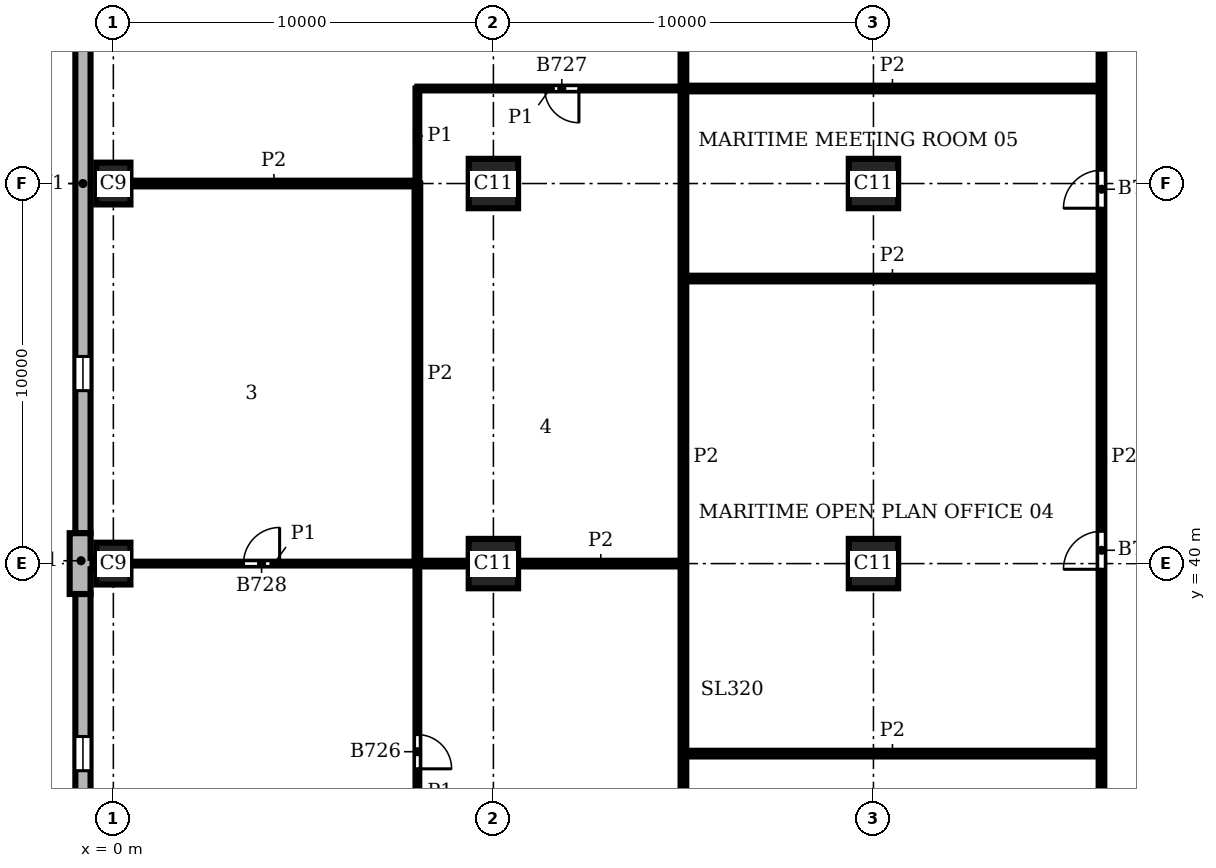
"""IFC4 building model, lengths in metres.
Left out: names, types, materials, properties, quantities, classifications, styles, units other than length and angle.
Written with IfcOpenShell. Run it as: python <this file> out.ifc"""

import sys

from ifc_helpers import new_model, si_unit, direction, frame, frame_2d, origin, origin_2d, place, context, subcontext, project, spatial, polyline, rectangle, outline, extrude, element, fill, save


model = new_model("IFC4")
c1 = context("Model", 3, precision=1e-05, world=origin(), true_north=direction((0.0, 1.0)))
c2 = subcontext(c1, "Body", "Model", "MODEL_VIEW")
j1 = project(units=[si_unit("LENGTHUNIT", "METRE"), si_unit("PLANEANGLEUNIT", "RADIAN")], contexts=[c1])
p1 = place(None, origin())
s1 = spatial("IfcSite", under=j1, at=p1, CompositionType="ELEMENT")
p2 = place(p1, origin())
s2 = spatial("IfcBuilding", under=s1, at=p2, CompositionType="ELEMENT")
p3 = place(p2, frame((0.0, 0.0, 209.7)))
s3 = spatial("IfcBuildingStorey", under=s2, at=p3, CompositionType="ELEMENT", Elevation=209.7)
for number, where, z_axis, x_axis in (
    (1, (0.0, 50.0, 0.0), (0.0, 0.0, 1.0), (0.0, 1.0, 0.0)),
    (2, (0.0, 40.0, 0.0), (0.0, 0.0, 1.0), (0.0, 1.0, 0.0)),
):
    element("IfcColumn", number, at=place(p3, frame(where, z_axis=z_axis, x_axis=x_axis)), inside=s3, PredefinedType="COLUMN", context=c2, shape_type="SweptSolid", body=[
        extrude(rectangle(XDim=1.1, YDim=0.9, at=origin_2d()), origin(), (0.0, 0.0, 1.0), 3.9),
    ])
for number, where, z_axis, x_axis in (
    (3, (10.0, 40.0, 0.0), (0.0, 0.0, 1.0), (1.0, 0.0, 0.0)),
    (4, (10.0, 50.0, 0.0), (0.0, 0.0, 1.0), (1.0, 0.0, 0.0)),
    (5, (20.0, 40.0, 0.0), (0.0, 0.0, 1.0), (1.0, 0.0, 0.0)),
    (6, (20.0, 50.0, 0.0), (0.0, 0.0, 1.0), (1.0, 0.0, 0.0)),
):
    element("IfcColumn", number, at=place(p3, frame(where, z_axis=z_axis, x_axis=x_axis)), inside=s3, PredefinedType="COLUMN", context=c2, shape_type="SweptSolid", body=[
        extrude(rectangle(XDim=1.3, YDim=1.3, at=origin_2d()), origin(), (0.0, 0.0, 1.0), 3.9),
    ])
p4 = place(p3, origin())
e7 = element("IfcWall", 7, at=p4, inside=s3, PredefinedType="SOLIDWALL", context=c2, shape_type="SweptSolid", body=[
    extrude(outline(polyline([(-0.6, 39.2), (-0.6, 39.85), (-0.55, 39.85), (-0.55, 40.15), (-0.6, 40.15), (-0.6, 40.8), (-1.0, 40.8), (-1.15, 40.8), (-1.15, 40.0), (-1.15, 39.2), (-1.0, 39.2), (-0.6, 39.2)])), origin(), (0.0, 0.0, 1.0), 3.9),
])
p5 = place(p3, frame((-0.8, 59.2, 0.0), z_axis=(0.0, 0.0, 1.0), x_axis=(0.0, -1.0, 0.0)))
e8 = element("IfcWall", 8, at=p5, inside=s3, PredefinedType="SOLIDWALL", context=c2, shape_type="SweptSolid", body=[
    extrude(rectangle(XDim=18.4, YDim=0.4, at=frame_2d((9.2, 0.0))), origin(), (0.0, 0.0, 1.0), 3.9),
])
p6 = place(p5, frame((3.75, 0.0, 0.9)))
e9 = element("IfcOpeningElement", 9, at=p6, cuts=e8, PredefinedType="OPENING", context=c2, shape_type="SweptSolid", body=[
    extrude(rectangle(XDim=0.9, YDim=2.35, at=frame_2d((0.45, 1.175))), frame((0.0, 0.21, 0.0), z_axis=(0.0, -1.0, 0.0), x_axis=(1.0, 0.0, 0.0)), (0.0, 0.0, 1.0), 0.42),
])
p7 = place(p5, frame((13.75, 0.0, 0.9)))
e10 = element("IfcOpeningElement", 10, at=p7, cuts=e8, PredefinedType="OPENING", context=c2, shape_type="SweptSolid", body=[
    extrude(rectangle(XDim=0.9, YDim=2.35, at=frame_2d((0.45, 1.175))), frame((0.0, 0.21, 0.0), z_axis=(0.0, -1.0, 0.0), x_axis=(1.0, 0.0, 0.0)), (0.0, 0.0, 1.0), 0.42),
])
p8 = place(p3, frame((-0.8, 39.2, 0.0), z_axis=(0.0, 0.0, 1.0), x_axis=(0.0, -1.0, 0.0)))
e11 = element("IfcWall", 11, at=p8, inside=s3, PredefinedType="SOLIDWALL", context=c2, shape_type="SweptSolid", body=[
    extrude(rectangle(XDim=18.4, YDim=0.4, at=frame_2d((9.2, 0.0))), origin(), (0.0, 0.0, 1.0), 3.9),
])
p9 = place(p8, frame((3.75, 0.0, 0.9)))
e12 = element("IfcOpeningElement", 12, at=p9, cuts=e11, PredefinedType="OPENING", context=c2, shape_type="SweptSolid", body=[
    extrude(rectangle(XDim=0.9, YDim=2.35, at=frame_2d((0.45, 1.175))), frame((0.0, 0.21, 0.0), z_axis=(0.0, -1.0, 0.0), x_axis=(1.0, 0.0, 0.0)), (0.0, 0.0, 1.0), 0.42),
])
p10 = place(p8, frame((13.75, 0.0, 0.9)))
e13 = element("IfcOpeningElement", 13, at=p10, cuts=e11, PredefinedType="OPENING", context=c2, shape_type="SweptSolid", body=[
    extrude(rectangle(XDim=0.9, YDim=2.35, at=frame_2d((0.45, 1.175))), frame((0.0, 0.21, 0.0), z_axis=(0.0, -1.0, 0.0), x_axis=(1.0, 0.0, 0.0)), (0.0, 0.0, 1.0), 0.42),
])
p11 = place(p3, frame((8.0, 28.0, 0.0), z_axis=(0.0, 0.0, 1.0), x_axis=(0.0, 1.0, 0.0)))
e14 = element("IfcWall", 14, at=p11, inside=s3, PredefinedType="PARTITIONING", context=c2, shape_type="SweptSolid", body=[
    extrude(rectangle(XDim=12.0, YDim=0.1, at=frame_2d((6.0, 0.0))), origin(), (0.0, 0.0, 1.0), 3.58),
])
p12 = place(p11, frame((6.6, 0.0, 0.0)))
e15 = element("IfcOpeningElement", 15, at=p12, cuts=e14, PredefinedType="OPENING", context=c2, shape_type="SweptSolid", body=[
    extrude(rectangle(XDim=0.9, YDim=2.1, at=frame_2d((0.45, 1.05))), frame((0.0, 0.06, 0.0), z_axis=(0.0, -1.0, 0.0), x_axis=(1.0, 0.0, 0.0)), (0.0, 0.0, 1.0), 0.12),
])
p13 = place(p3, frame((8.0, 50.0, 0.0), z_axis=(0.0, 0.0, 1.0), x_axis=(0.0, 1.0, 0.0)))
e16 = element("IfcWall", 16, at=p13, inside=s3, PredefinedType="PARTITIONING", context=c2, shape_type="SweptSolid", body=[
    extrude(rectangle(XDim=2.5, YDim=0.1, at=frame_2d((1.25, 0.0))), origin(), (0.0, 0.0, 1.0), 3.58),
])
p14 = place(p3, frame((0.45, 40.0, 0.0), z_axis=(0.0, 0.0, 1.0), x_axis=(1.0, 0.0, 0.0)))
e17 = element("IfcWall", 17, at=p14, inside=s3, PredefinedType="PARTITIONING", context=c2, shape_type="SweptSolid", body=[
    extrude(rectangle(XDim=7.55, YDim=0.1, at=frame_2d((3.775, 0.0))), origin(), (0.0, 0.0, 1.0), 3.58),
])
p15 = place(p14, frame((2.975, 0.0, 0.0)))
e18 = element("IfcOpeningElement", 18, at=p15, cuts=e17, PredefinedType="OPENING", context=c2, shape_type="SweptSolid", body=[
    extrude(rectangle(XDim=0.95, YDim=2.1, at=frame_2d((0.475, 1.05))), frame((0.0, 0.06, 0.0), z_axis=(0.0, -1.0, 0.0), x_axis=(1.0, 0.0, 0.0)), (0.0, 0.0, 1.0), 0.12),
])
p16 = place(p3, frame((8.0, 52.5, 0.0), z_axis=(0.0, 0.0, 1.0), x_axis=(1.0, 0.0, 0.0)))
e19 = element("IfcWall", 19, at=p16, inside=s3, PredefinedType="PARTITIONING", context=c2, shape_type="SweptSolid", body=[
    extrude(rectangle(XDim=7.0, YDim=0.1, at=frame_2d((3.5, 0.0))), origin(), (0.0, 0.0, 1.0), 3.58),
])
p17 = place(p16, frame((3.35, 0.0, 0.0)))
e20 = element("IfcOpeningElement", 20, at=p17, cuts=e19, PredefinedType="OPENING", context=c2, shape_type="SweptSolid", body=[
    extrude(rectangle(XDim=0.9, YDim=2.1, at=frame_2d((0.45, 1.05))), frame((0.0, 0.06, 0.0), z_axis=(0.0, -1.0, 0.0), x_axis=(1.0, 0.0, 0.0)), (0.0, 0.0, 1.0), 0.12),
])
p18 = place(p3, frame((8.0, 40.0, 0.0), z_axis=(0.0, 0.0, 1.0), x_axis=(0.0, 1.0, 0.0)))
e21 = element("IfcWall", 21, at=p18, inside=s3, PredefinedType="PARTITIONING", context=c2, shape_type="SweptSolid", body=[
    extrude(rectangle(XDim=10.0, YDim=0.15, at=frame_2d((5.0, 0.0))), origin(), (0.0, 0.0, 1.0), 3.58),
])
p19 = place(p3, frame((15.0, 28.0, 0.0), z_axis=(0.0, 0.0, 1.0), x_axis=(0.0, 1.0, 0.0)))
e22 = element("IfcWall", 22, at=p19, inside=s3, PredefinedType="PARTITIONING", context=c2, shape_type="SweptSolid", body=[
    extrude(rectangle(XDim=29.6, YDim=0.15, at=frame_2d((14.8, 0.0))), origin(), (0.0, 0.0, 1.0), 3.58),
])
p20 = place(p3, frame((26.0, 28.0, 0.0), z_axis=(0.0, 0.0, 1.0), x_axis=(0.0, 1.0, 0.0)))
e23 = element("IfcWall", 23, at=p20, inside=s3, PredefinedType="PARTITIONING", context=c2, shape_type="SweptSolid", body=[
    extrude(rectangle(XDim=29.6, YDim=0.15, at=frame_2d((14.8, 0.0))), origin(), (0.0, 0.0, 1.0), 3.58),
])
p21 = place(p20, frame((3.6, 0.0, 0.0)))
e24 = element("IfcOpeningElement", 24, at=p21, cuts=e23, PredefinedType="OPENING", context=c2, shape_type="SweptSolid", body=[
    extrude(rectangle(XDim=1.0, YDim=2.1, at=frame_2d((0.5, 1.05))), frame((0.0, 0.085, 0.0), z_axis=(0.0, -1.0, 0.0), x_axis=(1.0, 0.0, 0.0)), (0.0, 0.0, 1.0), 0.17),
])
p22 = place(p20, frame((11.85, 0.0, 0.0)))
e25 = element("IfcOpeningElement", 25, at=p22, cuts=e23, PredefinedType="OPENING", context=c2, shape_type="SweptSolid", body=[
    extrude(rectangle(XDim=1.0, YDim=2.1, at=frame_2d((0.5, 1.05))), frame((0.0, 0.085, 0.0), z_axis=(0.0, -1.0, 0.0), x_axis=(1.0, 0.0, 0.0)), (0.0, 0.0, 1.0), 0.17),
])
p23 = place(p20, frame((21.35, 0.0, 0.0)))
e26 = element("IfcOpeningElement", 26, at=p23, cuts=e23, PredefinedType="OPENING", context=c2, shape_type="SweptSolid", body=[
    extrude(rectangle(XDim=1.0, YDim=2.1, at=frame_2d((0.5, 1.05))), frame((0.0, 0.085, 0.0), z_axis=(0.0, -1.0, 0.0), x_axis=(1.0, 0.0, 0.0)), (0.0, 0.0, 1.0), 0.17),
])
p24 = place(p3, frame((15.0, 35.0, 0.0), z_axis=(0.0, 0.0, 1.0), x_axis=(1.0, 0.0, 0.0)))
e27 = element("IfcWall", 27, at=p24, inside=s3, PredefinedType="PARTITIONING", context=c2, shape_type="SweptSolid", body=[
    extrude(rectangle(XDim=11.0, YDim=0.15, at=frame_2d((5.5, 0.0))), origin(), (0.0, 0.0, 1.0), 3.58),
])
p25 = place(p3, frame((8.0, 40.0, 0.0), z_axis=(0.0, 0.0, 1.0), x_axis=(1.0, 0.0, 0.0)))
e28 = element("IfcWall", 28, at=p25, inside=s3, PredefinedType="PARTITIONING", context=c2, shape_type="SweptSolid", body=[
    extrude(rectangle(XDim=1.35, YDim=0.15, at=frame_2d((0.675, 0.0))), origin(), (0.0, 0.0, 1.0), 3.58),
])
p26 = place(p3, frame((10.65, 40.0, 0.0), z_axis=(0.0, 0.0, 1.0), x_axis=(1.0, 0.0, 0.0)))
e29 = element("IfcWall", 29, at=p26, inside=s3, PredefinedType="PARTITIONING", context=c2, shape_type="SweptSolid", body=[
    extrude(rectangle(XDim=4.35, YDim=0.15, at=frame_2d((2.175, 0.0))), origin(), (0.0, 0.0, 1.0), 3.58),
])
p27 = place(p3, frame((15.0, 47.5, 0.0), z_axis=(0.0, 0.0, 1.0), x_axis=(1.0, 0.0, 0.0)))
e30 = element("IfcWall", 30, at=p27, inside=s3, PredefinedType="PARTITIONING", context=c2, shape_type="SweptSolid", body=[
    extrude(rectangle(XDim=11.0, YDim=0.15, at=frame_2d((5.5, 0.0))), origin(), (0.0, 0.0, 1.0), 3.58),
])
p28 = place(p3, frame((0.45, 50.0, 0.0), z_axis=(0.0, 0.0, 1.0), x_axis=(1.0, 0.0, 0.0)))
e31 = element("IfcWall", 31, at=p28, inside=s3, PredefinedType="PARTITIONING", context=c2, shape_type="SweptSolid", body=[
    extrude(rectangle(XDim=7.55, YDim=0.15, at=frame_2d((3.775, 0.0))), origin(), (0.0, 0.0, 1.0), 3.58),
])
p29 = place(p3, frame((15.0, 52.5, 0.0), z_axis=(0.0, 0.0, 1.0), x_axis=(1.0, 0.0, 0.0)))
e32 = element("IfcWall", 32, at=p29, inside=s3, PredefinedType="PARTITIONING", context=c2, shape_type="SweptSolid", body=[
    extrude(rectangle(XDim=11.0, YDim=0.15, at=frame_2d((5.5, 0.0))), origin(), (0.0, 0.0, 1.0), 3.58),
])
p30 = place(p7, origin())
e33 = element("IfcWindow", 33, at=p30, inside=s3, PartitioningType="SINGLE_PANEL", PredefinedType="WINDOW", context=c2, shape_type="SweptSolid", body=[
    extrude(rectangle(XDim=0.9, YDim=2.35, at=frame_2d((0.45, 1.175))), frame((0.0, 0.16, 0.0), z_axis=(0.0, -1.0, 0.0), x_axis=(1.0, 0.0, 0.0)), (0.0, 0.0, 1.0), 0.06),
])
fill(e10, e33)
p31 = place(p9, origin())
e34 = element("IfcWindow", 34, at=p31, inside=s3, PartitioningType="SINGLE_PANEL", PredefinedType="WINDOW", context=c2, shape_type="SweptSolid", body=[
    extrude(rectangle(XDim=0.9, YDim=2.35, at=frame_2d((0.45, 1.175))), frame((0.0, 0.16, 0.0), z_axis=(0.0, -1.0, 0.0), x_axis=(1.0, 0.0, 0.0)), (0.0, 0.0, 1.0), 0.06),
])
fill(e12, e34)
p32 = place(p22, origin())
e35 = element("IfcDoor", 35, at=p32, inside=s3, OperationType="SINGLE_SWING_LEFT", PredefinedType="DOOR", context=c2, shape_type="SweptSolid", body=[
    extrude(rectangle(XDim=1.0, YDim=2.1, at=frame_2d((0.5, 1.05))), frame((0.0, 0.025, 0.0), z_axis=(0.0, -1.0, 0.0), x_axis=(1.0, 0.0, 0.0)), (0.0, 0.0, 1.0), 0.05),
])
fill(e25, e35)
p33 = place(p23, origin())
e36 = element("IfcDoor", 36, at=p33, inside=s3, OperationType="SINGLE_SWING_LEFT", PredefinedType="DOOR", context=c2, shape_type="SweptSolid", body=[
    extrude(rectangle(XDim=1.0, YDim=2.1, at=frame_2d((0.5, 1.05))), frame((0.0, 0.025, 0.0), z_axis=(0.0, -1.0, 0.0), x_axis=(1.0, 0.0, 0.0)), (0.0, 0.0, 1.0), 0.05),
])
fill(e26, e36)
p34 = place(p12, frame((0.9, 0.0, 0.0), z_axis=(0.0, 0.0, 1.0), x_axis=(-1.0, 0.0, 0.0)))
e37 = element("IfcDoor", 37, at=p34, inside=s3, OperationType="SINGLE_SWING_RIGHT", PredefinedType="DOOR", context=c2, shape_type="SweptSolid", body=[
    extrude(rectangle(XDim=0.9, YDim=2.1, at=frame_2d((0.45, 1.05))), frame((0.0, 0.025, 0.0), z_axis=(0.0, -1.0, 0.0), x_axis=(1.0, 0.0, 0.0)), (0.0, 0.0, 1.0), 0.05),
])
fill(e15, e37)
p35 = place(p17, frame((0.9, 0.0, 0.0), z_axis=(0.0, 0.0, 1.0), x_axis=(-1.0, 0.0, 0.0)))
e38 = element("IfcDoor", 38, at=p35, inside=s3, OperationType="SINGLE_SWING_LEFT", PredefinedType="DOOR", context=c2, shape_type="SweptSolid", body=[
    extrude(rectangle(XDim=0.9, YDim=2.1, at=frame_2d((0.45, 1.05))), frame((0.0, 0.025, 0.0), z_axis=(0.0, -1.0, 0.0), x_axis=(1.0, 0.0, 0.0)), (0.0, 0.0, 1.0), 0.05),
])
fill(e20, e38)
p36 = place(p15, origin())
e39 = element("IfcDoor", 39, at=p36, inside=s3, OperationType="SINGLE_SWING_RIGHT", PredefinedType="DOOR", context=c2, shape_type="SweptSolid", body=[
    extrude(rectangle(XDim=0.95, YDim=2.1, at=frame_2d((0.475, 1.05))), frame((0.0, 0.025, 0.0), z_axis=(0.0, -1.0, 0.0), x_axis=(1.0, 0.0, 0.0)), (0.0, 0.0, 1.0), 0.05),
])
fill(e18, e39)
save(model, sys.argv[1])
